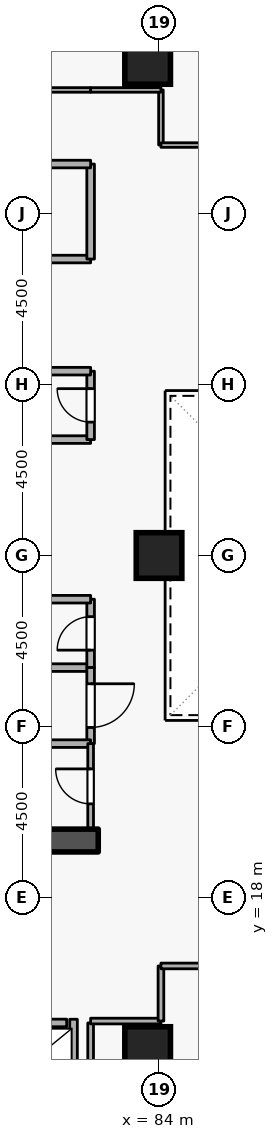
"""IFC4 building model, lengths in metres.
Left out: names, types, materials, properties, quantities, classifications, styles, units other than length and angle.
Written with IfcOpenShell. Run it as: python <this file> out.ifc"""

import sys

from ifc_helpers import new_model, si_unit, direction, frame, frame_2d, origin, origin_2d, place, context, subcontext, project, spatial, rectangle, extrude, element, fill, save


model = new_model("IFC4")
c1 = context("Model", 3, precision=1e-05, world=origin(), true_north=direction((0.0, 1.0)))
c2 = subcontext(c1, "Body", "Model", "MODEL_VIEW")
j1 = project(units=[si_unit("LENGTHUNIT", "METRE"), si_unit("PLANEANGLEUNIT", "RADIAN")], contexts=[c1])
p1 = place(None, origin())
s1 = spatial("IfcSite", under=j1, at=p1, CompositionType="ELEMENT")
p2 = place(p1, origin())
s2 = spatial("IfcBuilding", under=s1, at=p2, CompositionType="ELEMENT")
p3 = place(p2, frame((0.0, 0.0, 98.1)))
s3 = spatial("IfcBuildingStorey", under=s2, at=p3, CompositionType="ELEMENT", Elevation=98.1)
p4 = place(p3, frame((76.7, 19.5, 0.0), z_axis=(0.0, 0.0, 1.0), x_axis=(1.0, 0.0, 0.0)))
e1 = element("IfcWall", 1, at=p4, inside=s3, PredefinedType="SHEAR", context=c2, shape_type="SweptSolid", body=[
    extrude(rectangle(XDim=5.7, YDim=0.6, at=frame_2d((2.85, 0.0))), origin(), (0.0, 0.0, 1.0), 3.6),
])
for number, where, z_axis, x_axis in (
    (2, (83.7, 14.0, 0.0), (0.0, 0.0, 1.0), (1.0, 0.0, 0.0)),
    (3, (83.7, 40.0, 0.0), (0.0, 0.0, 1.0), (1.0, 0.0, 0.0)),
    (4, (84.0, 27.0, 0.0), (0.0, 0.0, 1.0), (1.0, 0.0, 0.0)),
):
    element("IfcColumn", number, at=place(p3, frame(where, z_axis=z_axis, x_axis=x_axis)), inside=s3, PredefinedType="COLUMN", context=c2, shape_type="SweptSolid", body=[
        extrude(rectangle(XDim=1.2, YDim=1.2, at=origin_2d()), origin(), (0.0, 0.0, 1.0), 3.6),
    ])
p5 = place(p3, frame((79.63, 14.7, 0.0), z_axis=(0.0, 0.0, 1.0), x_axis=(1.0, 0.0, 0.0)))
e5 = element("IfcWall", 5, at=p5, inside=s3, PredefinedType="STANDARD", context=c2, shape_type="SweptSolid", body=[
    extrude(rectangle(XDim=1.94, YDim=0.2, at=frame_2d((0.97, 0.0))), origin(), (0.0, 0.0, 1.0), 3.3),
])
p6 = place(p5, frame((0.46, 0.0, 0.0)))
e6 = element("IfcOpeningElement", 6, at=p6, cuts=e5, PredefinedType="OPENING", context=c2, shape_type="SweptSolid", body=[
    extrude(rectangle(XDim=1.02, YDim=2.06, at=frame_2d((0.51, 1.03))), frame((0.0, 0.11, 0.0), z_axis=(0.0, -1.0, 0.0), x_axis=(1.0, 0.0, 0.0)), (0.0, 0.0, 1.0), 0.22),
])
p7 = place(p3, frame((81.75, 12.612, 0.0), z_axis=(0.0, 0.0, 1.0), x_axis=(0.0, 1.0, 0.0)))
e7 = element("IfcWall", 7, at=p7, inside=s3, PredefinedType="STANDARD", context=c2, shape_type="SweptSolid", body=[
    extrude(rectangle(XDim=2.186, YDim=0.2, at=frame_2d((1.093, 0.0))), origin(), (0.0, 0.0, 1.0), 3.3),
])
p8 = place(p3, frame((79.9, 34.8, 0.0), z_axis=(0.0, 0.0, 1.0), x_axis=(1.0, 0.0, 0.0)))
e8 = element("IfcWall", 8, at=p8, inside=s3, PredefinedType="STANDARD", context=c2, shape_type="SweptSolid", body=[
    extrude(rectangle(XDim=2.3, YDim=0.2, at=frame_2d((1.15, 0.0))), origin(), (0.0, 0.0, 1.0), 2.505),
])
p9 = place(p3, frame((82.2, 34.8, 0.0), z_axis=(0.0, 0.0, 1.0), x_axis=(0.0, 1.0, 0.0)))
e9 = element("IfcWall", 9, at=p9, inside=s3, PredefinedType="STANDARD", context=c2, shape_type="SweptSolid", body=[
    extrude(rectangle(XDim=2.5, YDim=0.2, at=frame_2d((1.25, 0.0))), origin(), (0.0, 0.0, 1.0), 3.3),
])
p10 = place(p3, frame((82.2, 37.3, 0.0), z_axis=(0.0, 0.0, 1.0), x_axis=(-1.0, 0.0, 0.0)))
e10 = element("IfcWall", 10, at=p10, inside=s3, PredefinedType="STANDARD", context=c2, shape_type="SweptSolid", body=[
    extrude(rectangle(XDim=5.7, YDim=0.2, at=frame_2d((2.85, 0.0))), origin(), (0.0, 0.0, 1.0), 3.3),
])
p11 = place(p10, frame((2.275, 0.0, 0.0)))
e11 = element("IfcOpeningElement", 11, at=p11, cuts=e10, PredefinedType="OPENING", context=c2, shape_type="SweptSolid", body=[
    extrude(rectangle(XDim=1.15, YDim=2.1, at=frame_2d((0.575, 1.05))), frame((0.0, 0.11, 0.0), z_axis=(0.0, -1.0, 0.0), x_axis=(1.0, 0.0, 0.0)), (0.0, 0.0, 1.0), 0.22),
])
p12 = place(p3, frame((80.15, 24.05, 0.0), z_axis=(0.0, 0.0, 1.0), x_axis=(1.0, 0.0, 0.0)))
e12 = element("IfcWall", 12, at=p12, inside=s3, PredefinedType="STANDARD", context=c2, shape_type="SweptSolid", body=[
    extrude(rectangle(XDim=2.05, YDim=0.2, at=frame_2d((1.025, 0.0))), origin(), (0.0, 0.0, 1.0), 3.3),
])
p13 = place(p3, frame((82.2, 24.05, 0.0), z_axis=(0.0, 0.0, 1.0), x_axis=(0.0, 1.0, 0.0)))
e13 = element("IfcWall", 13, at=p13, inside=s3, PredefinedType="STANDARD", context=c2, shape_type="SweptSolid", body=[
    extrude(rectangle(XDim=1.8, YDim=0.2, at=frame_2d((0.9, 0.0))), origin(), (0.0, 0.0, 1.0), 3.3),
])
p14 = place(p13, frame((0.46, 0.0, 0.0)))
e14 = element("IfcOpeningElement", 14, at=p14, cuts=e13, PredefinedType="OPENING", context=c2, shape_type="SweptSolid", body=[
    extrude(rectangle(XDim=0.88, YDim=2.04, at=frame_2d((0.44, 1.02))), frame((0.0, 0.11, 0.0), z_axis=(0.0, -1.0, 0.0), x_axis=(1.0, 0.0, 0.0)), (0.0, 0.0, 1.0), 0.22),
])
for number, where, z_axis, x_axis in (
    (15, (82.2, 25.85, 0.0), (0.0, 0.0, 1.0), (-1.0, 0.0, 0.0)),
    (16, (80.15, 30.05, 0.0), (0.0, 0.0, 1.0), (1.0, 0.0, 0.0)),
):
    element("IfcWall", number, at=place(p3, frame(where, z_axis=z_axis, x_axis=x_axis)), inside=s3, PredefinedType="STANDARD", context=c2, shape_type="SweptSolid", body=[
        extrude(rectangle(XDim=2.05, YDim=0.2, at=frame_2d((1.025, 0.0))), origin(), (0.0, 0.0, 1.0), 3.3),
    ])
p15 = place(p3, frame((82.2, 30.05, 0.0), z_axis=(0.0, 0.0, 1.0), x_axis=(0.0, 1.0, 0.0)))
e17 = element("IfcWall", 17, at=p15, inside=s3, PredefinedType="STANDARD", context=c2, shape_type="SweptSolid", body=[
    extrude(rectangle(XDim=1.8, YDim=0.2, at=frame_2d((0.9, 0.0))), origin(), (0.0, 0.0, 1.0), 3.3),
])
p16 = place(p15, frame((0.46, 0.0, 0.0)))
e18 = element("IfcOpeningElement", 18, at=p16, cuts=e17, PredefinedType="OPENING", context=c2, shape_type="SweptSolid", body=[
    extrude(rectangle(XDim=0.88, YDim=2.04, at=frame_2d((0.44, 1.02))), frame((0.0, 0.11, 0.0), z_axis=(0.0, -1.0, 0.0), x_axis=(1.0, 0.0, 0.0)), (0.0, 0.0, 1.0), 0.22),
])
p17 = place(p3, frame((82.2, 31.85, 0.0), z_axis=(0.0, 0.0, 1.0), x_axis=(-1.0, 0.0, 0.0)))
e19 = element("IfcWall", 19, at=p17, inside=s3, PredefinedType="STANDARD", context=c2, shape_type="SweptSolid", body=[
    extrude(rectangle(XDim=2.05, YDim=0.2, at=frame_2d((1.025, 0.0))), origin(), (0.0, 0.0, 1.0), 3.3),
])
p18 = place(p3, frame((82.2, 24.05, 0.0), z_axis=(0.0, 0.0, 1.0), x_axis=(0.0, -1.0, 0.0)))
e20 = element("IfcWall", 20, at=p18, inside=s3, PredefinedType="STANDARD", context=c2, shape_type="SweptSolid", body=[
    extrude(rectangle(XDim=2.0, YDim=0.2, at=frame_2d((1.0, 0.0))), origin(), (0.0, 0.0, 1.0), 3.3),
])
p19 = place(p18, frame((0.425, 0.0, 0.0)))
e21 = element("IfcOpeningElement", 21, at=p19, cuts=e20, PredefinedType="OPENING", context=c2, shape_type="SweptSolid", body=[
    extrude(rectangle(XDim=1.15, YDim=2.1, at=frame_2d((0.575, 1.05))), frame((0.0, 0.11, 0.0), z_axis=(0.0, -1.0, 0.0), x_axis=(1.0, 0.0, 0.0)), (0.0, 0.0, 1.0), 0.22),
])
p20 = place(p3, frame((82.2, 22.05, 0.0), z_axis=(0.0, 0.0, 1.0), x_axis=(-1.0, 0.0, 0.0)))
e22 = element("IfcWall", 22, at=p20, inside=s3, PredefinedType="STANDARD", context=c2, shape_type="SweptSolid", body=[
    extrude(rectangle(XDim=2.05, YDim=0.2, at=frame_2d((1.025, 0.0))), origin(), (0.0, 0.0, 1.0), 3.3),
])
p21 = place(p3, frame((82.2, 19.8, 0.0), z_axis=(0.0, 0.0, 1.0), x_axis=(0.0, 1.0, 0.0)))
e23 = element("IfcWall", 23, at=p21, inside=s3, PredefinedType="PARTITIONING", context=c2, shape_type="SweptSolid", body=[
    extrude(rectangle(XDim=2.25, YDim=0.15, at=frame_2d((1.125, 0.0))), origin(), (0.0, 0.0, 1.0), 3.3),
])
p22 = place(p21, frame((0.665, 0.0, 0.0)))
e24 = element("IfcOpeningElement", 24, at=p22, cuts=e23, PredefinedType="OPENING", context=c2, shape_type="SweptSolid", body=[
    extrude(rectangle(XDim=0.92, YDim=2.08, at=frame_2d((0.46, 1.04))), frame((0.0, 0.085, 0.0), z_axis=(0.0, -1.0, 0.0), x_axis=(1.0, 0.0, 0.0)), (0.0, 0.0, 1.0), 0.17),
])
p23 = place(p3, frame((82.2, 12.4, 0.0), z_axis=(0.0, 0.0, 1.0), x_axis=(0.0, 1.0, 0.0)))
e25 = element("IfcWall", 25, at=p23, inside=s3, PredefinedType="PARTITIONING", context=c2, shape_type="SweptSolid", body=[
    extrude(rectangle(XDim=2.3, YDim=0.15, at=frame_2d((1.15, 0.0))), origin(), (0.0, 0.0, 1.0), 3.3),
])
p24 = place(p3, frame((82.2, 14.75, 0.0), z_axis=(0.0, 0.0, 1.0), x_axis=(1.0, 0.0, 0.0)))
e26 = element("IfcWall", 26, at=p24, inside=s3, PredefinedType="PARTITIONING", context=c2, shape_type="SweptSolid", body=[
    extrude(rectangle(XDim=1.85, YDim=0.15, at=frame_2d((0.925, 0.0))), origin(), (0.0, 0.0, 1.0), 3.3),
])
p25 = place(p3, frame((84.05, 14.75, 0.0), z_axis=(0.0, 0.0, 1.0), x_axis=(0.0, 1.0, 0.0)))
e27 = element("IfcWall", 27, at=p25, inside=s3, PredefinedType="PARTITIONING", context=c2, shape_type="SweptSolid", body=[
    extrude(rectangle(XDim=1.45, YDim=0.15, at=frame_2d((0.725, 0.0))), origin(), (0.0, 0.0, 1.0), 3.3),
])
p26 = place(p3, frame((84.05, 16.2, 0.0), z_axis=(0.0, 0.0, 1.0), x_axis=(1.0, 0.0, 0.0)))
e28 = element("IfcWall", 28, at=p26, inside=s3, PredefinedType="PARTITIONING", context=c2, shape_type="SweptSolid", body=[
    extrude(rectangle(XDim=4.45, YDim=0.15, at=frame_2d((2.225, 0.0))), origin(), (0.0, 0.0, 1.0), 3.3),
])
p27 = place(p26, frame((1.575, 0.0, 0.0)))
e29 = element("IfcOpeningElement", 29, at=p27, cuts=e28, PredefinedType="OPENING", context=c2, shape_type="SweptSolid", body=[
    extrude(rectangle(XDim=1.3, YDim=2.12, at=frame_2d((0.65, 1.06))), frame((0.0, 0.085, 0.0), z_axis=(0.0, -1.0, 0.0), x_axis=(1.0, 0.0, 0.0)), (0.0, 0.0, 1.0), 0.17),
])
p28 = place(p3, frame((84.05, 37.8, 0.0), z_axis=(0.0, 0.0, 1.0), x_axis=(0.0, 1.0, 0.0)))
e30 = element("IfcWall", 30, at=p28, inside=s3, PredefinedType="PARTITIONING", context=c2, shape_type="SweptSolid", body=[
    extrude(rectangle(XDim=1.45, YDim=0.12, at=frame_2d((0.725, 0.0))), origin(), (0.0, 0.0, 1.0), 3.3),
])
p29 = place(p3, frame((84.05, 39.25, 0.0), z_axis=(0.0, 0.0, 1.0), x_axis=(-1.0, 0.0, 0.0)))
e31 = element("IfcWall", 31, at=p29, inside=s3, PredefinedType="PARTITIONING", context=c2, shape_type="SweptSolid", body=[
    extrude(rectangle(XDim=1.85, YDim=0.12, at=frame_2d((0.925, 0.0))), origin(), (0.0, 0.0, 1.0), 3.3),
])
p30 = place(p3, frame((82.2, 39.25, 0.0), z_axis=(0.0, 0.0, 1.0), x_axis=(-1.0, 0.0, 0.0)))
e32 = element("IfcWall", 32, at=p30, inside=s3, PredefinedType="PARTITIONING", context=c2, shape_type="SweptSolid", body=[
    extrude(rectangle(XDim=9.35, YDim=0.12, at=frame_2d((4.675, 0.0))), origin(), (0.0, 0.0, 1.0), 3.3),
])
p31 = place(p30, frame((4.15, 0.0, 0.0)))
e33 = element("IfcOpeningElement", 33, at=p31, cuts=e32, PredefinedType="OPENING", context=c2, shape_type="SweptSolid", body=[
    extrude(rectangle(XDim=1.05, YDim=2.1, at=frame_2d((0.525, 1.05))), frame((0.0, 0.07, 0.0), z_axis=(0.0, -1.0, 0.0), x_axis=(1.0, 0.0, 0.0)), (0.0, 0.0, 1.0), 0.14),
])
p32 = place(p3, frame((88.5, 37.8, 0.0), z_axis=(0.0, 0.0, 1.0), x_axis=(-1.0, 0.0, 0.0)))
e34 = element("IfcWall", 34, at=p32, inside=s3, PredefinedType="PARTITIONING", context=c2, shape_type="SweptSolid", body=[
    extrude(rectangle(XDim=4.45, YDim=0.12, at=frame_2d((2.225, 0.0))), origin(), (0.0, 0.0, 1.0), 3.3),
])
p33 = place(p14, origin())
e35 = element("IfcDoor", 35, at=p33, inside=s3, OperationType="SINGLE_SWING_LEFT", PredefinedType="DOOR", context=c2, shape_type="SweptSolid", body=[
    extrude(rectangle(XDim=0.88, YDim=2.04, at=frame_2d((0.44, 1.02))), frame((0.0, 0.025, 0.0), z_axis=(0.0, -1.0, 0.0), x_axis=(1.0, 0.0, 0.0)), (0.0, 0.0, 1.0), 0.05),
])
fill(e14, e35)
p34 = place(p16, origin())
e36 = element("IfcDoor", 36, at=p34, inside=s3, OperationType="SINGLE_SWING_RIGHT", PredefinedType="DOOR", context=c2, shape_type="SweptSolid", body=[
    extrude(rectangle(XDim=0.88, YDim=2.04, at=frame_2d((0.44, 1.02))), frame((0.0, 0.025, 0.0), z_axis=(0.0, -1.0, 0.0), x_axis=(1.0, 0.0, 0.0)), (0.0, 0.0, 1.0), 0.05),
])
fill(e18, e36)
p35 = place(p22, origin())
e37 = element("IfcDoor", 37, at=p35, inside=s3, OperationType="SINGLE_SWING_RIGHT", PredefinedType="DOOR", context=c2, shape_type="SweptSolid", body=[
    extrude(rectangle(XDim=0.92, YDim=2.08, at=frame_2d((0.46, 1.04))), frame((0.0, 0.025, 0.0), z_axis=(0.0, -1.0, 0.0), x_axis=(1.0, 0.0, 0.0)), (0.0, 0.0, 1.0), 0.05),
])
fill(e24, e37)
p36 = place(p19, origin())
e38 = element("IfcDoor", 38, at=p36, inside=s3, OperationType="SINGLE_SWING_LEFT", PredefinedType="DOOR", context=c2, shape_type="SweptSolid", body=[
    extrude(rectangle(XDim=1.15, YDim=2.1, at=frame_2d((0.575, 1.05))), frame((0.0, 0.025, 0.0), z_axis=(0.0, -1.0, 0.0), x_axis=(1.0, 0.0, 0.0)), (0.0, 0.0, 1.0), 0.05),
])
fill(e21, e38)
save(model, sys.argv[1])
